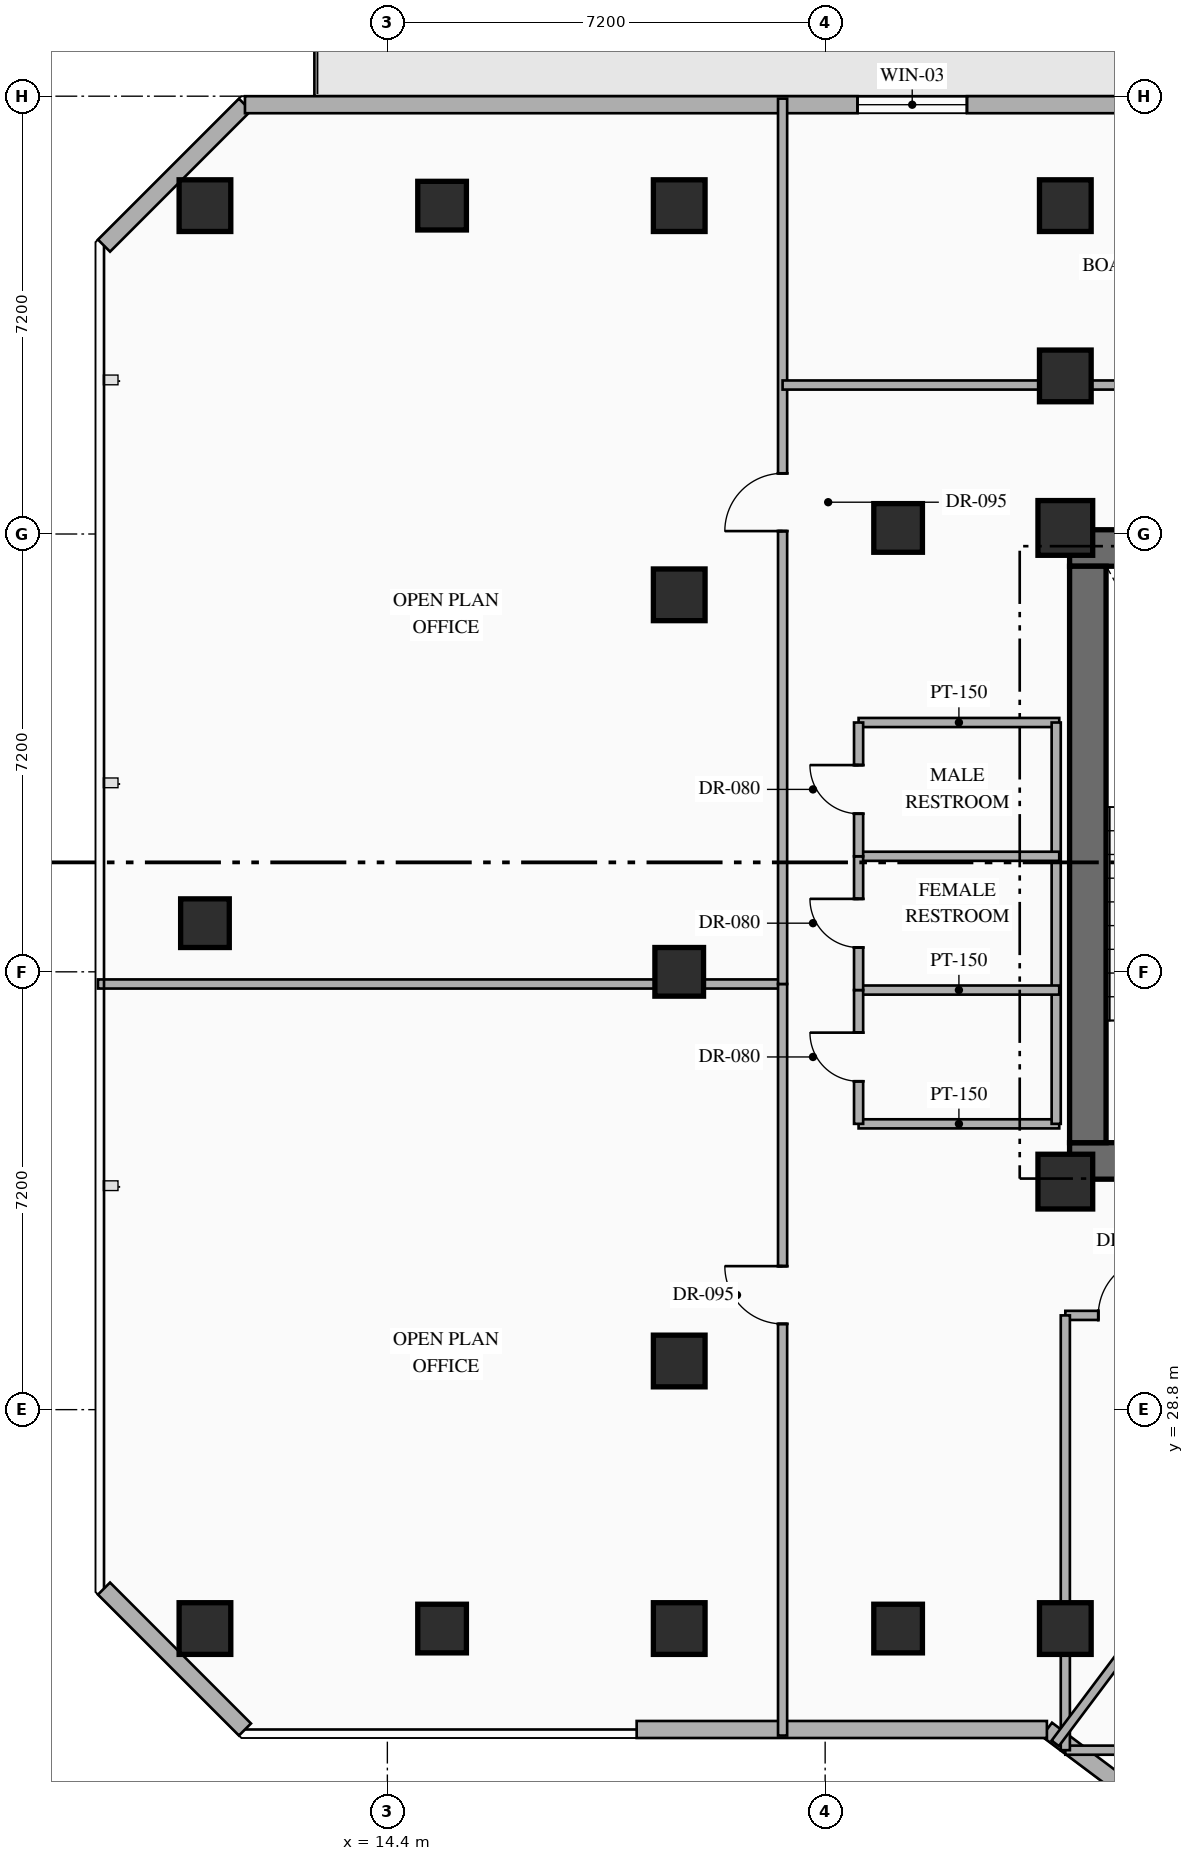
"""IFC4 building model, lengths in metres.
Left out: names, types, materials, properties, quantities, classifications, styles, units other than length and angle.
Written with IfcOpenShell. Run it as: python <this file> out.ifc"""

import sys

from ifc_helpers import new_model, si_unit, direction, frame, frame_2d, origin, origin_2d, place, context, subcontext, project, spatial, rectangle, hollow_rectangle, extrude, element, fill, save


model = new_model("IFC4")
c1 = context("Model", 3, precision=1e-05, world=origin(), true_north=direction((0.0, 1.0)))
c2 = subcontext(c1, "Body", "Model", "MODEL_VIEW")
j1 = project(units=[si_unit("LENGTHUNIT", "METRE"), si_unit("PLANEANGLEUNIT", "RADIAN")], contexts=[c1])
p1 = place(None, origin())
s1 = spatial("IfcSite", under=j1, at=p1, CompositionType="ELEMENT")
p2 = place(p1, origin())
s2 = spatial("IfcBuilding", under=s1, at=p2, CompositionType="ELEMENT")
p3 = place(p2, frame((0.0, 0.0, 138.45)))
s3 = spatial("IfcBuildingStorey", under=s2, at=p3, CompositionType="ELEMENT", Elevation=138.45)
p4 = place(p3, frame((25.62, 32.89, 0.0), z_axis=(0.0, 0.0, 1.0), x_axis=(1.0, 0.0, 0.0)))
e1 = element("IfcWall", 1, at=p4, inside=s3, PredefinedType="SHEAR", context=c2, shape_type="SweptSolid", body=[
    extrude(rectangle(XDim=7.78, YDim=0.6, at=frame_2d((3.89, 0.0))), origin(), (0.0, 0.0, 1.0), 3.6),
])
p5 = place(p4, frame((2.83, 0.0, 0.0)))
e2 = element("IfcOpeningElement", 2, at=p5, cuts=e1, PredefinedType="OPENING", context=c2, shape_type="SweptSolid", body=[
    extrude(rectangle(XDim=1.1, YDim=2.2, at=frame_2d((0.55, 1.1))), frame((0.0, 0.31, 0.0), z_axis=(0.0, -1.0, 0.0), x_axis=(1.0, 0.0, 0.0)), (0.0, 0.0, 1.0), 0.62),
])
p6 = place(p4, frame((5.58, 0.0, 0.0)))
e3 = element("IfcOpeningElement", 3, at=p6, cuts=e1, PredefinedType="OPENING", context=c2, shape_type="SweptSolid", body=[
    extrude(rectangle(XDim=1.1, YDim=2.15, at=frame_2d((0.55, 1.075))), frame((0.0, 0.31, 0.0), z_axis=(0.0, -1.0, 0.0), x_axis=(1.0, 0.0, 0.0)), (0.0, 0.0, 1.0), 0.62),
])
p7 = place(p3, frame((25.62, 42.97, 0.0), z_axis=(0.0, 0.0, 1.0), x_axis=(1.0, 0.0, 0.0)))
e4 = element("IfcWall", 4, at=p7, inside=s3, PredefinedType="SHEAR", context=c2, shape_type="SweptSolid", body=[
    extrude(rectangle(XDim=7.78, YDim=0.6, at=frame_2d((3.89, 0.0))), origin(), (0.0, 0.0, 1.0), 3.6),
])
p8 = place(p3, frame((25.92, 33.19, 0.0), z_axis=(0.0, 0.0, 1.0), x_axis=(0.0, 1.0, 0.0)))
e5 = element("IfcWall", 5, at=p8, inside=s3, PredefinedType="SHEAR", context=c2, shape_type="SweptSolid", body=[
    extrude(rectangle(XDim=9.48, YDim=0.6, at=frame_2d((4.74, 0.0))), origin(), (0.0, 0.0, 1.0), 3.6),
])
for number, where, z_axis, x_axis in (
    (6, (25.55, 32.55, 0.0), (0.0, 0.0, 1.0), (1.0, 0.0, 0.0)),
    (7, (25.55, 43.3, 0.0), (0.0, 0.0, 1.0), (1.0, 0.0, 0.0)),
):
    element("IfcColumn", number, at=place(p3, frame(where, z_axis=z_axis, x_axis=x_axis)), inside=s3, PredefinedType="COLUMN", context=c2, shape_type="SweptSolid", body=[
        extrude(rectangle(XDim=0.9, YDim=0.9, at=origin_2d()), origin(), (0.0, 0.0, 1.0), 3.6),
    ])
for number, where, z_axis, x_axis in (
    (8, (25.55, 25.2, 0.0), (0.0, 0.0, 1.0), (1.0, 0.0, 0.0)),
    (9, (25.55, 45.8, 0.0), (0.0, 0.0, 1.0), (1.0, 0.0, 0.0)),
    (10, (11.4, 25.2, 0.0), (0.0, 0.0, 1.0), (1.0, 0.0, 0.0)),
    (11, (11.4, 48.6, 0.0), (0.0, 0.0, 1.0), (1.0, 0.0, 0.0)),
    (12, (19.2, 48.6, 0.0), (0.0, 0.0, 1.0), (1.0, 0.0, 0.0)),
    (13, (25.55, 48.6, 0.0), (0.0, 0.0, 1.0), (1.0, 0.0, 0.0)),
    (14, (19.2, 25.2, 0.0), (0.0, 0.0, 1.0), (1.0, 0.0, 0.0)),
    (15, (19.2, 29.6, 0.0), (0.0, 0.0, 1.0), (1.0, 0.0, 0.0)),
    (16, (19.2, 42.2, 0.0), (0.0, 0.0, 1.0), (1.0, 0.0, 0.0)),
):
    element("IfcColumn", number, at=place(p3, frame(where, z_axis=z_axis, x_axis=x_axis)), inside=s3, PredefinedType="COLUMN", context=c2, shape_type="SweptSolid", body=[
        extrude(hollow_rectangle(XDim=0.85, YDim=0.85, WallThickness=0.032, at=origin_2d()), origin(), (0.0, 0.0, 1.0), 3.6),
    ])
for number, where, z_axis, x_axis in (
    (17, (22.8, 25.2, 0.0), (0.0, 0.0, 1.0), (1.0, 0.0, 0.0)),
    (18, (22.8, 43.3, 0.0), (0.0, 0.0, 1.0), (1.0, 0.0, 0.0)),
    (19, (11.4, 36.8, 0.0), (0.0, 0.0, 1.0), (1.0, 0.0, 0.0)),
    (20, (19.2, 36.0, 0.0), (0.0, 0.0, 1.0), (1.0, 0.0, 0.0)),
    (21, (15.3, 25.2, 0.0), (0.0, 0.0, 1.0), (1.0, 0.0, 0.0)),
    (22, (15.3, 48.6, 0.0), (0.0, 0.0, 1.0), (1.0, 0.0, 0.0)),
):
    element("IfcColumn", number, at=place(p3, frame(where, z_axis=z_axis, x_axis=x_axis)), inside=s3, PredefinedType="COLUMN", context=c2, shape_type="SweptSolid", body=[
        extrude(hollow_rectangle(XDim=0.8, YDim=0.8, WallThickness=0.032, at=origin_2d()), origin(), (0.0, 0.0, 1.0), 3.6),
    ])
p9 = place(p3, frame((44.918, 8.787, 0.0), z_axis=(0.0, 0.0, 1.0), x_axis=(-0.800004765927, 0.599993645378, 0.0)))
e23 = element("IfcWall", 23, at=p9, inside=s3, PredefinedType="STANDARD", context=c2, shape_type="SweptSolid", body=[
    extrude(rectangle(XDim=24.588, YDim=0.28, at=frame_2d((12.294, 0.0))), origin(), (0.0, 0.0, 1.0), 3.35),
])
p10 = place(p3, frame((25.247, 23.54, 0.0), z_axis=(0.0, 0.0, 1.0), x_axis=(-1.0, 0.0, 0.0)))
e24 = element("IfcWall", 24, at=p10, inside=s3, PredefinedType="STANDARD", context=c2, shape_type="SweptSolid", body=[
    extrude(rectangle(XDim=6.747, YDim=0.28, at=frame_2d((3.374, 0.0))), origin(), (0.0, 0.0, 1.0), 3.35),
])
p11 = place(p3, frame((12.058, 23.54, 0.0), z_axis=(0.0, 0.0, 1.0), x_axis=(-0.707144017911, 0.707069542501, 0.0)))
e25 = element("IfcWall", 25, at=p11, inside=s3, PredefinedType="STANDARD", context=c2, shape_type="SweptSolid", body=[
    extrude(rectangle(XDim=3.278, YDim=0.28, at=frame_2d((1.639, 0.0))), origin(), (0.0, 0.0, 1.0), 3.35),
])
p12 = place(p3, frame((9.74, 47.942, 0.0), z_axis=(0.0, 0.0, 1.0), x_axis=(0.707106781187, 0.707106781187, 0.0)))
e26 = element("IfcWall", 26, at=p12, inside=s3, PredefinedType="STANDARD", context=c2, shape_type="SweptSolid", body=[
    extrude(rectangle(XDim=3.278, YDim=0.28, at=frame_2d((1.639, 0.0))), origin(), (0.0, 0.0, 1.0), 3.35),
])
p13 = place(p3, frame((12.058, 50.26, 0.0), z_axis=(0.0, 0.0, 1.0), x_axis=(1.0, 0.0, 0.0)))
e27 = element("IfcWall", 27, at=p13, inside=s3, PredefinedType="STANDARD", context=c2, shape_type="SweptSolid", body=[
    extrude(rectangle(XDim=30.484, YDim=0.28, at=frame_2d((15.242, 0.0))), origin(), (0.0, 0.0, 1.0), 3.35),
])
p14 = place(p13, frame((14.992, 0.0, 0.0)))
e28 = element("IfcOpeningElement", 28, at=p14, cuts=e27, PredefinedType="OPENING", context=c2, shape_type="SweptSolid", body=[
    extrude(rectangle(XDim=1.1, YDim=2.2, at=frame_2d((0.55, 1.1))), frame((0.0, 0.15, 0.0), z_axis=(0.0, -1.0, 0.0), x_axis=(1.0, 0.0, 0.0)), (0.0, 0.0, 1.0), 0.3),
])
p15 = place(p13, frame((10.074, 0.0, 0.85)))
e29 = element("IfcOpeningElement", 29, at=p15, cuts=e27, PredefinedType="OPENING", context=c2, shape_type="SweptSolid", body=[
    extrude(rectangle(XDim=1.8, YDim=2.1, at=frame_2d((0.9, 1.05))), frame((0.0, 0.15, 0.0), z_axis=(0.0, -1.0, 0.0), x_axis=(1.0, 0.0, 0.0)), (0.0, 0.0, 1.0), 0.3),
])
for number, where, z_axis, x_axis in (
    (30, (22.15, 33.5, 0.0), (0.0, 0.0, 1.0), (1.0, 0.0, 0.0)),
    (31, (22.15, 40.1, 0.0), (0.0, 0.0, 1.0), (1.0, 0.0, 0.0)),
):
    element("IfcWall", number, at=place(p3, frame(where, z_axis=z_axis, x_axis=x_axis)), inside=s3, PredefinedType="PARTITIONING", context=c2, shape_type="SweptSolid", body=[
        extrude(rectangle(XDim=3.3, YDim=0.15, at=frame_2d((1.65, 0.0))), origin(), (0.0, 0.0, 1.0), 3.35),
    ])
p16 = place(p3, frame((25.4, 33.5, 0.0), z_axis=(0.0, 0.0, 1.0), x_axis=(0.0, 1.0, 0.0)))
e32 = element("IfcWall", 32, at=p16, inside=s3, PredefinedType="PARTITIONING", context=c2, shape_type="SweptSolid", body=[
    extrude(rectangle(XDim=6.6, YDim=0.15, at=frame_2d((3.3, 0.0))), origin(), (0.0, 0.0, 1.0), 3.35),
])
for number, where, z_axis, x_axis in (
    (33, (22.15, 35.7, 0.0), (0.0, 0.0, 1.0), (1.0, 0.0, 0.0)),
    (34, (22.15, 37.9, 0.0), (0.0, 0.0, 1.0), (1.0, 0.0, 0.0)),
):
    element("IfcWall", number, at=place(p3, frame(where, z_axis=z_axis, x_axis=x_axis)), inside=s3, PredefinedType="PARTITIONING", context=c2, shape_type="SweptSolid", body=[
        extrude(rectangle(XDim=3.3, YDim=0.15, at=frame_2d((1.65, 0.0))), origin(), (0.0, 0.0, 1.0), 3.35),
    ])
p17 = place(p3, frame((22.15, 33.5, 0.0), z_axis=(0.0, 0.0, 1.0), x_axis=(0.0, 1.0, 0.0)))
e35 = element("IfcWall", 35, at=p17, inside=s3, PredefinedType="PARTITIONING", context=c2, shape_type="SweptSolid", body=[
    extrude(rectangle(XDim=2.2, YDim=0.15, at=frame_2d((1.1, 0.0))), origin(), (0.0, 0.0, 1.0), 3.35),
])
p18 = place(p17, frame((0.7, 0.0, 0.0)))
e36 = element("IfcOpeningElement", 36, at=p18, cuts=e35, PredefinedType="OPENING", context=c2, shape_type="SweptSolid", body=[
    extrude(rectangle(XDim=0.8, YDim=2.06, at=frame_2d((0.4, 1.03))), frame((0.0, 0.085, 0.0), z_axis=(0.0, -1.0, 0.0), x_axis=(1.0, 0.0, 0.0)), (0.0, 0.0, 1.0), 0.17),
])
p19 = place(p3, frame((22.15, 35.7, 0.0), z_axis=(0.0, 0.0, 1.0), x_axis=(0.0, 1.0, 0.0)))
e37 = element("IfcWall", 37, at=p19, inside=s3, PredefinedType="PARTITIONING", context=c2, shape_type="SweptSolid", body=[
    extrude(rectangle(XDim=2.2, YDim=0.15, at=frame_2d((1.1, 0.0))), origin(), (0.0, 0.0, 1.0), 3.35),
])
p20 = place(p19, frame((0.7, 0.0, 0.0)))
e38 = element("IfcOpeningElement", 38, at=p20, cuts=e37, PredefinedType="OPENING", context=c2, shape_type="SweptSolid", body=[
    extrude(rectangle(XDim=0.8, YDim=2.06, at=frame_2d((0.4, 1.03))), frame((0.0, 0.085, 0.0), z_axis=(0.0, -1.0, 0.0), x_axis=(1.0, 0.0, 0.0)), (0.0, 0.0, 1.0), 0.17),
])
p21 = place(p3, frame((22.15, 37.9, 0.0), z_axis=(0.0, 0.0, 1.0), x_axis=(0.0, 1.0, 0.0)))
e39 = element("IfcWall", 39, at=p21, inside=s3, PredefinedType="PARTITIONING", context=c2, shape_type="SweptSolid", body=[
    extrude(rectangle(XDim=2.2, YDim=0.15, at=frame_2d((1.1, 0.0))), origin(), (0.0, 0.0, 1.0), 3.35),
])
p22 = place(p21, frame((0.7, 0.0, 0.0)))
e40 = element("IfcOpeningElement", 40, at=p22, cuts=e39, PredefinedType="OPENING", context=c2, shape_type="SweptSolid", body=[
    extrude(rectangle(XDim=0.8, YDim=2.06, at=frame_2d((0.4, 1.03))), frame((0.0, 0.085, 0.0), z_axis=(0.0, -1.0, 0.0), x_axis=(1.0, 0.0, 0.0)), (0.0, 0.0, 1.0), 0.17),
])
p23 = place(p3, frame((25.55, 23.2, 0.0), z_axis=(0.0, 0.0, 1.0), x_axis=(1.0, 0.0, 0.0)))
e41 = element("IfcWall", 41, at=p23, inside=s3, PredefinedType="PARTITIONING", context=c2, shape_type="SweptSolid", body=[
    extrude(rectangle(XDim=4.95, YDim=0.15, at=frame_2d((2.475, 0.0))), origin(), (0.0, 0.0, 1.0), 3.35),
])
p24 = place(p3, frame((25.55, 30.35, 0.0), z_axis=(0.0, 0.0, 1.0), x_axis=(1.0, 0.0, 0.0)))
e42 = element("IfcWall", 42, at=p24, inside=s3, PredefinedType="PARTITIONING", context=c2, shape_type="SweptSolid", body=[
    extrude(rectangle(XDim=4.95, YDim=0.15, at=frame_2d((2.475, 0.0))), origin(), (0.0, 0.0, 1.0), 3.35),
])
p25 = place(p24, frame((0.542, 0.0, 0.0)))
e43 = element("IfcOpeningElement", 43, at=p25, cuts=e42, PredefinedType="OPENING", context=c2, shape_type="SweptSolid", body=[
    extrude(rectangle(XDim=0.95, YDim=2.15, at=frame_2d((0.475, 1.075))), frame((0.0, 0.085, 0.0), z_axis=(0.0, -1.0, 0.0), x_axis=(1.0, 0.0, 0.0)), (0.0, 0.0, 1.0), 0.17),
])
p26 = place(p3, frame((25.55, 23.2, 0.0), z_axis=(0.0, 0.0, 1.0), x_axis=(0.0, 1.0, 0.0)))
e44 = element("IfcWall", 44, at=p26, inside=s3, PredefinedType="PARTITIONING", context=c2, shape_type="SweptSolid", body=[
    extrude(rectangle(XDim=7.15, YDim=0.15, at=frame_2d((3.575, 0.0))), origin(), (0.0, 0.0, 1.0), 2.695),
])
p27 = place(p3, frame((9.64, 35.8, 0.0), z_axis=(0.0, 0.0, 1.0), x_axis=(1.0, 0.0, 0.0)))
e45 = element("IfcWall", 45, at=p27, inside=s3, PredefinedType="PARTITIONING", context=c2, shape_type="SweptSolid", body=[
    extrude(rectangle(XDim=11.26, YDim=0.15, at=frame_2d((5.63, 0.0))), origin(), (0.0, 0.0, 1.0), 2.695),
])
p28 = place(p3, frame((20.9, 23.44, 0.0), z_axis=(0.0, 0.0, 1.0), x_axis=(0.0, 1.0, 0.0)))
e46 = element("IfcWall", 46, at=p28, inside=s3, PredefinedType="PARTITIONING", context=c2, shape_type="SweptSolid", body=[
    extrude(rectangle(XDim=12.36, YDim=0.15, at=frame_2d((6.18, 0.0))), origin(), (0.0, 0.0, 1.0), 3.35),
])
p29 = place(p28, frame((6.77, 0.0, 0.0)))
e47 = element("IfcOpeningElement", 47, at=p29, cuts=e46, PredefinedType="OPENING", context=c2, shape_type="SweptSolid", body=[
    extrude(rectangle(XDim=0.95, YDim=2.15, at=frame_2d((0.475, 1.075))), frame((0.0, 0.085, 0.0), z_axis=(0.0, -1.0, 0.0), x_axis=(1.0, 0.0, 0.0)), (0.0, 0.0, 1.0), 0.17),
])
p30 = place(p3, frame((20.9, 35.8, 0.0), z_axis=(0.0, 0.0, 1.0), x_axis=(0.0, 1.0, 0.0)))
e48 = element("IfcWall", 48, at=p30, inside=s3, PredefinedType="PARTITIONING", context=c2, shape_type="SweptSolid", body=[
    extrude(rectangle(XDim=14.56, YDim=0.15, at=frame_2d((7.28, 0.0))), origin(), (0.0, 0.0, 1.0), 3.35),
])
p31 = place(p30, frame((7.448, 0.0, 0.0)))
e49 = element("IfcOpeningElement", 49, at=p31, cuts=e48, PredefinedType="OPENING", context=c2, shape_type="SweptSolid", body=[
    extrude(rectangle(XDim=0.95, YDim=2.15, at=frame_2d((0.475, 1.075))), frame((0.0, 0.085, 0.0), z_axis=(0.0, -1.0, 0.0), x_axis=(1.0, 0.0, 0.0)), (0.0, 0.0, 1.0), 0.17),
])
p32 = place(p3, frame((20.9, 45.65, 0.0), z_axis=(0.0, 0.0, 1.0), x_axis=(1.0, 0.0, 0.0)))
e50 = element("IfcWall", 50, at=p32, inside=s3, PredefinedType="PARTITIONING", context=c2, shape_type="SweptSolid", body=[
    extrude(rectangle(XDim=11.9, YDim=0.15, at=frame_2d((5.95, 0.0))), origin(), (0.0, 0.0, 1.0), 2.695),
])
p33 = place(p32, frame((6.494, 0.0, 0.0)))
e51 = element("IfcOpeningElement", 51, at=p33, cuts=e50, PredefinedType="OPENING", context=c2, shape_type="SweptSolid", body=[
    extrude(rectangle(XDim=0.95, YDim=2.15, at=frame_2d((0.475, 1.075))), frame((0.0, 0.085, 0.0), z_axis=(0.0, -1.0, 0.0), x_axis=(1.0, 0.0, 0.0)), (0.0, 0.0, 1.0), 0.17),
])
p34 = place(p3, frame((25.384, 23.312, 0.0), z_axis=(0.0, 0.0, 1.0), x_axis=(0.599990721155, 0.80000695905, 0.0)))
e52 = element("IfcWall", 52, at=p34, inside=s3, PredefinedType="PARTITIONING", context=c2, shape_type="SweptSolid", body=[
    extrude(rectangle(XDim=4.21, YDim=0.15, at=frame_2d((2.105, 0.0))), origin(), (0.0, 0.0, 1.0), 3.35),
])
p35 = place(p15, origin())
e53 = element("IfcWindow", 53, at=p35, inside=s3, PartitioningType="SINGLE_PANEL", PredefinedType="WINDOW", context=c2, shape_type="SweptSolid", body=[
    extrude(rectangle(XDim=1.8, YDim=2.1, at=frame_2d((0.9, 1.05))), frame((0.0, 0.03, 0.0), z_axis=(0.0, -1.0, 0.0), x_axis=(1.0, 0.0, 0.0)), (0.0, 0.0, 1.0), 0.06),
])
fill(e29, e53)
p36 = place(p18, origin())
e54 = element("IfcDoor", 54, at=p36, inside=s3, OperationType="SINGLE_SWING_RIGHT", PredefinedType="DOOR", context=c2, shape_type="SweptSolid", body=[
    extrude(rectangle(XDim=0.8, YDim=2.06, at=frame_2d((0.4, 1.03))), frame((0.0, 0.025, 0.0), z_axis=(0.0, -1.0, 0.0), x_axis=(1.0, 0.0, 0.0)), (0.0, 0.0, 1.0), 0.05),
])
fill(e36, e54)
p37 = place(p20, origin())
e55 = element("IfcDoor", 55, at=p37, inside=s3, OperationType="SINGLE_SWING_RIGHT", PredefinedType="DOOR", context=c2, shape_type="SweptSolid", body=[
    extrude(rectangle(XDim=0.8, YDim=2.06, at=frame_2d((0.4, 1.03))), frame((0.0, 0.025, 0.0), z_axis=(0.0, -1.0, 0.0), x_axis=(1.0, 0.0, 0.0)), (0.0, 0.0, 1.0), 0.05),
])
fill(e38, e55)
p38 = place(p22, origin())
e56 = element("IfcDoor", 56, at=p38, inside=s3, OperationType="SINGLE_SWING_RIGHT", PredefinedType="DOOR", context=c2, shape_type="SweptSolid", body=[
    extrude(rectangle(XDim=0.8, YDim=2.06, at=frame_2d((0.4, 1.03))), frame((0.0, 0.025, 0.0), z_axis=(0.0, -1.0, 0.0), x_axis=(1.0, 0.0, 0.0)), (0.0, 0.0, 1.0), 0.05),
])
fill(e40, e56)
p39 = place(p25, origin())
e57 = element("IfcDoor", 57, at=p39, inside=s3, OperationType="SINGLE_SWING_RIGHT", PredefinedType="DOOR", context=c2, shape_type="SweptSolid", body=[
    extrude(rectangle(XDim=0.95, YDim=2.15, at=frame_2d((0.475, 1.075))), frame((0.0, 0.025, 0.0), z_axis=(0.0, -1.0, 0.0), x_axis=(1.0, 0.0, 0.0)), (0.0, 0.0, 1.0), 0.05),
])
fill(e43, e57)
p40 = place(p29, origin())
e58 = element("IfcDoor", 58, at=p40, inside=s3, OperationType="SINGLE_SWING_RIGHT", PredefinedType="DOOR", context=c2, shape_type="SweptSolid", body=[
    extrude(rectangle(XDim=0.95, YDim=2.15, at=frame_2d((0.475, 1.075))), frame((0.0, 0.025, 0.0), z_axis=(0.0, -1.0, 0.0), x_axis=(1.0, 0.0, 0.0)), (0.0, 0.0, 1.0), 0.05),
])
fill(e47, e58)
p41 = place(p31, origin())
e59 = element("IfcDoor", 59, at=p41, inside=s3, OperationType="SINGLE_SWING_LEFT", PredefinedType="DOOR", context=c2, shape_type="SweptSolid", body=[
    extrude(rectangle(XDim=0.95, YDim=2.15, at=frame_2d((0.475, 1.075))), frame((0.0, 0.025, 0.0), z_axis=(0.0, -1.0, 0.0), x_axis=(1.0, 0.0, 0.0)), (0.0, 0.0, 1.0), 0.05),
])
fill(e49, e59)
save(model, sys.argv[1])
